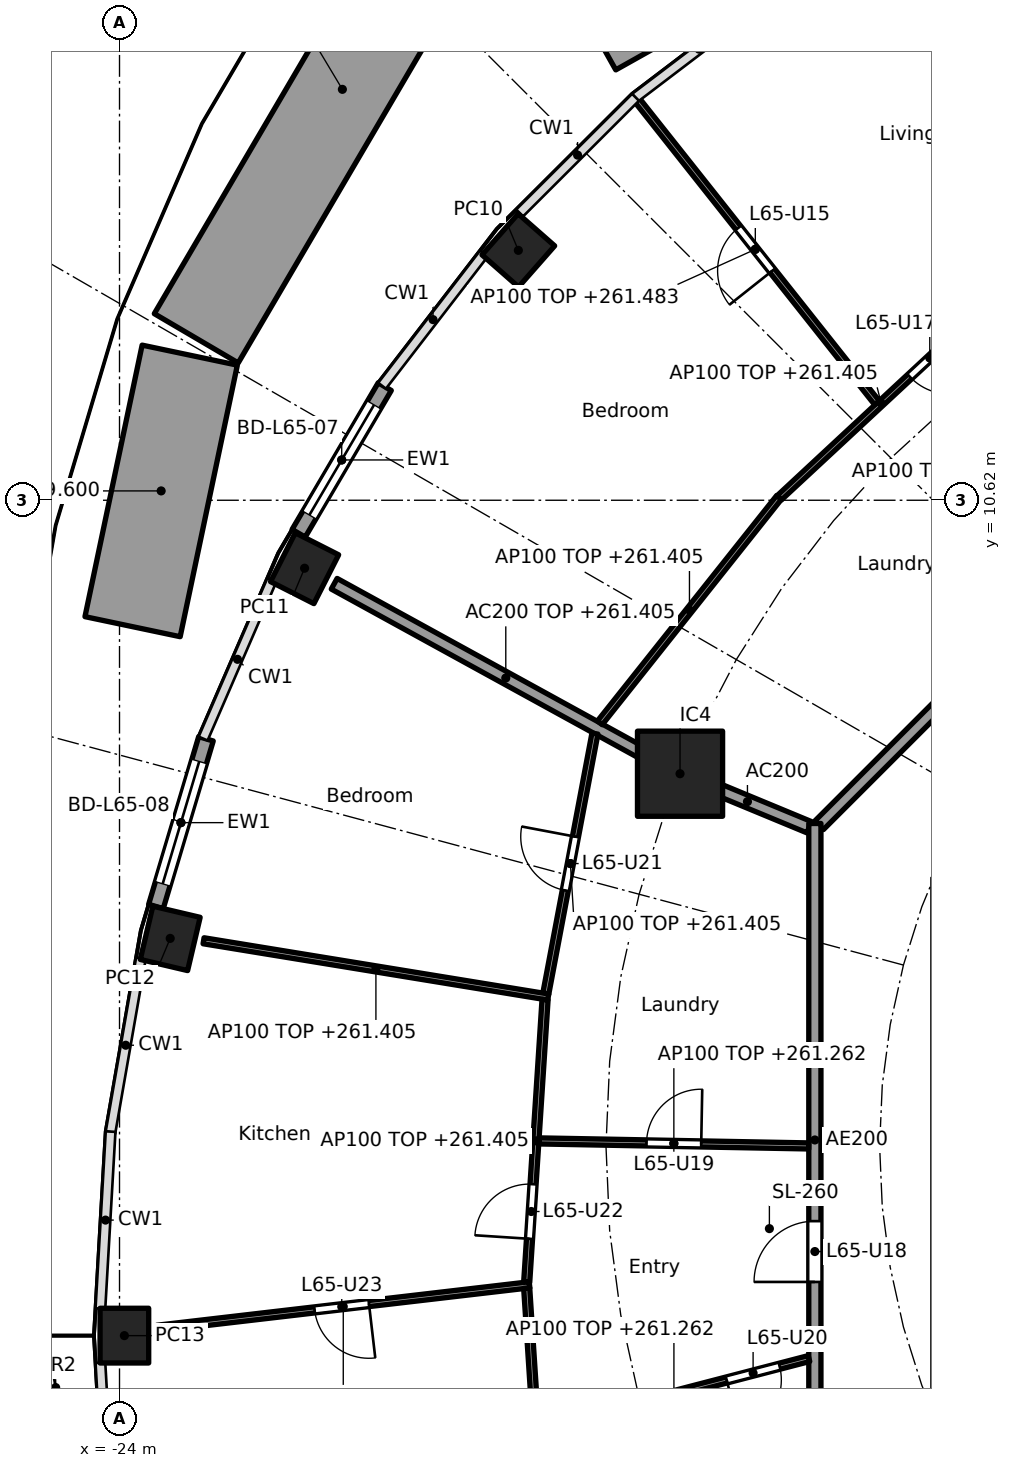
"""IFC4 building model, lengths in metres.
Left out: names, types, materials, properties, quantities, classifications, styles, units other than length and angle.
Written with IfcOpenShell. Run it as: python <this file> out.ifc"""

import sys

from ifc_helpers import new_model, si_unit, direction, frame, frame_2d, origin, origin_2d, place, context, subcontext, project, spatial, rectangle, hollow_rectangle, extrude, element, fill, save


model = new_model("IFC4")
c1 = context("Model", 3, precision=1e-05, world=origin(), true_north=direction((0.0, 1.0)))
c2 = subcontext(c1, "Body", "Model", "MODEL_VIEW")
j1 = project(units=[si_unit("LENGTHUNIT", "METRE"), si_unit("PLANEANGLEUNIT", "RADIAN")], contexts=[c1])
p1 = place(None, origin())
s1 = spatial("IfcSite", under=j1, at=p1, CompositionType="ELEMENT")
p2 = place(p1, origin())
s2 = spatial("IfcBuilding", under=s1, at=p2, CompositionType="ELEMENT")
p3 = place(p2, frame((0.0, 0.0, 258.5)))
s3 = spatial("IfcBuildingStorey", under=s2, at=p3, CompositionType="ELEMENT", Elevation=258.5)
for number, where, z_axis, x_axis in (
    (1, (-17.441, 14.73, -0.26), (0.0, 0.0, 1.0), (-0.66, -0.751, 0.0)),
    (2, (-20.957, 9.502, -0.26), (0.0, 0.0, 1.0), (-0.452, -0.892, 0.0)),
    (3, (-23.166, 3.415, -0.26), (0.0, 0.0, 1.0), (-0.229, -0.973, 0.0)),
    (4, (-23.92, -3.118, -0.26), (0.0, 0.0, 1.0), (0.0, -1.0, 0.0)),
):
    element("IfcColumn", number, at=place(p3, frame(where, z_axis=z_axis, x_axis=x_axis)), inside=s3, PredefinedType="COLUMN", context=c2, shape_type="SweptSolid", body=[
        extrude(hollow_rectangle(XDim=0.9, YDim=0.8, WallThickness=0.028, at=origin_2d()), origin(), (0.0, 0.0, 1.0), 3.96),
    ])
p4 = place(p3, frame((-14.782, 6.123, 0.0), z_axis=(0.0, 0.0, 1.0), x_axis=(1.0, 0.0, 0.0)))
e5 = element("IfcColumn", 5, at=p4, inside=s3, PredefinedType="COLUMN", context=c2, shape_type="SweptSolid", body=[
    extrude(rectangle(XDim=1.4, YDim=1.4, at=origin_2d()), origin(), (0.0, 0.0, 1.0), 3.7),
])
p5 = place(p3, frame((-21.054, 10.077, 0.0), z_axis=(0.0, 0.0, 1.0), x_axis=(0.506371364425, 0.862315511452, 0.0)))
e6 = element("IfcWall", 6, at=p5, inside=s3, PredefinedType="SOLIDWALL", context=c2, shape_type="SweptSolid", body=[
    extrude(rectangle(XDim=2.796, YDim=0.25, at=frame_2d((1.398, 0.0))), origin(), (0.0, 0.0, 1.0), 3.44),
])
p6 = place(p5, frame((0.348, 0.0, 0.0)))
e7 = element("IfcOpeningElement", 7, at=p6, cuts=e6, PredefinedType="OPENING", context=c2, shape_type="SweptSolid", body=[
    extrude(rectangle(XDim=2.1, YDim=2.4, at=frame_2d((1.05, 1.2))), frame((0.0, 0.135, 0.0), z_axis=(0.0, -1.0, 0.0), x_axis=(1.0, 0.0, 0.0)), (0.0, 0.0, 1.0), 0.27),
])
p7 = place(p3, frame((-23.401, 3.94, 0.0), z_axis=(0.0, 0.0, 1.0), x_axis=(0.285876209024, 0.9582665564, 0.0)))
e8 = element("IfcWall", 8, at=p7, inside=s3, PredefinedType="SOLIDWALL", context=c2, shape_type="SweptSolid", body=[
    extrude(rectangle(XDim=2.877, YDim=0.25, at=frame_2d((1.438, 0.0))), origin(), (0.0, 0.0, 1.0), 3.44),
])
p8 = place(p7, frame((0.389, 0.0, 0.0)))
e9 = element("IfcOpeningElement", 9, at=p8, cuts=e8, PredefinedType="OPENING", context=c2, shape_type="SweptSolid", body=[
    extrude(rectangle(XDim=2.1, YDim=2.4, at=frame_2d((1.05, 1.2))), frame((0.0, 0.135, 0.0), z_axis=(0.0, -1.0, 0.0), x_axis=(1.0, 0.0, 0.0)), (0.0, 0.0, 1.0), 0.27),
])
p9 = place(p3, frame((-23.785, 8.541, 0.0), z_axis=(0.0, 0.0, 1.0), x_axis=(0.205983516992, 0.978555461243, 0.0)))
e10 = element("IfcWall", 10, at=p9, inside=s3, PredefinedType="SOLIDWALL", context=c2, shape_type="SweptSolid", body=[
    extrude(rectangle(XDim=4.563, YDim=1.6, at=frame_2d((2.282, 0.0))), origin(), (0.0, 0.0, 1.0), 1.1),
])
p10 = place(p3, frame((-22.738, 13.283, 0.0), z_axis=(0.0, 0.0, 1.0), x_axis=(0.506201816041, 0.862415051722, 0.0)))
e11 = element("IfcWall", 11, at=p10, inside=s3, PredefinedType="SOLIDWALL", context=c2, shape_type="SweptSolid", body=[
    extrude(rectangle(XDim=9.495, YDim=1.6, at=frame_2d((4.747, 0.0))), origin(), (0.0, 0.0, 1.0), 1.1),
])
p11 = place(p3, frame((-8.179, 22.911, 0.0), z_axis=(0.0, 0.0, 1.0), x_axis=(-0.872191481834, -0.489164613413, 0.0)))
e12 = element("IfcWall", 12, at=p11, inside=s3, PredefinedType="SOLIDWALL", context=c2, shape_type="SweptSolid", body=[
    extrude(rectangle(XDim=9.231, YDim=1.6, at=frame_2d((4.615, 0.0))), origin(), (0.0, 0.0, 1.0), 1.1),
])
p12 = place(p3, frame((-12.657, 5.243, 0.0), z_axis=(0.0, 0.0, 1.0), x_axis=(-0.923869415315, 0.382707856524, 0.0)))
e13 = element("IfcWall", 13, at=p12, inside=s3, PredefinedType="PARTITIONING", context=c2, shape_type="SweptSolid", body=[
    extrude(rectangle(XDim=2.2, YDim=0.2, at=frame_2d((1.1, 0.0))), origin(), (0.0, 0.0, 1.0), 3.44),
])
p13 = place(p3, frame((-14.826, 6.147, 0.0), z_axis=(0.0, 0.0, 1.0), x_axis=(-0.876484755865, 0.481429613481, 0.0)))
e14 = element("IfcWall", 14, at=p13, inside=s3, PredefinedType="PARTITIONING", context=c2, shape_type="SweptSolid", body=[
    extrude(rectangle(XDim=6.439, YDim=0.2, at=frame_2d((3.219, 0.0))), origin(), (0.0, 0.0, 1.0), 2.905),
])
p14 = place(p3, frame((-5.275, 12.494, 0.0), z_axis=(0.0, 0.0, 1.0), x_axis=(-0.707106781187, -0.707106781187, 0.0)))
e15 = element("IfcWall", 15, at=p14, inside=s3, PredefinedType="PARTITIONING", context=c2, shape_type="SweptSolid", body=[
    extrude(rectangle(XDim=10.209, YDim=0.2, at=frame_2d((5.104, 0.0))), origin(), (0.0, 0.0, 1.0), 3.44),
])
p15 = place(p3, frame((-12.565, 5.304, 0.0), z_axis=(0.0, 0.0, 1.0), x_axis=(0.0, -1.0, 0.0)))
e16 = element("IfcWall", 16, at=p15, inside=s3, PredefinedType="PARTITIONING", context=c2, shape_type="SweptSolid", body=[
    extrude(rectangle(XDim=10.409, YDim=0.2, at=frame_2d((5.205, 0.0))), origin(), (0.0, 0.0, 1.0), 3.44),
])
p16 = place(p15, frame((6.539, 0.0, 0.0)))
e17 = element("IfcOpeningElement", 17, at=p16, cuts=e16, PredefinedType="OPENING", context=c2, shape_type="SweptSolid", body=[
    extrude(rectangle(XDim=1.0, YDim=2.1, at=frame_2d((0.5, 1.05))), frame((0.0, 0.11, 0.0), z_axis=(0.0, -1.0, 0.0), x_axis=(1.0, 0.0, 0.0)), (0.0, 0.0, 1.0), 0.22),
])
p17 = place(p3, frame((-9.802, 13.77, 0.0), z_axis=(0.0, 0.0, 1.0), x_axis=(-0.732662099478, -0.680592571212, 0.0)))
e18 = element("IfcWall", 18, at=p17, inside=s3, PredefinedType="PARTITIONING", context=c2, shape_type="SweptSolid", body=[
    extrude(rectangle(XDim=4.567, YDim=0.1, at=frame_2d((2.283, 0.0))), origin(), (0.0, 0.0, 1.0), 2.905),
])
p18 = place(p17, frame((0.742, 0.0, 0.0)))
e19 = element("IfcOpeningElement", 19, at=p18, cuts=e18, PredefinedType="OPENING", context=c2, shape_type="SweptSolid", body=[
    extrude(rectangle(XDim=0.9, YDim=2.1, at=frame_2d((0.45, 1.05))), frame((0.0, 0.06, 0.0), z_axis=(0.0, -1.0, 0.0), x_axis=(1.0, 0.0, 0.0)), (0.0, 0.0, 1.0), 0.12),
])
p19 = place(p3, frame((-11.543, 12.221, 0.0), z_axis=(0.0, 0.0, 1.0), x_axis=(-0.621117202271, 0.783717692185, 0.0)))
e20 = element("IfcWall", 20, at=p19, inside=s3, PredefinedType="PARTITIONING", context=c2, shape_type="SweptSolid", body=[
    extrude(rectangle(XDim=6.444, YDim=0.1, at=frame_2d((3.222, 0.0))), origin(), (0.0, 0.0, 1.0), 2.983),
])
p20 = place(p19, frame((2.772, 0.0, 0.0)))
e21 = element("IfcOpeningElement", 21, at=p20, cuts=e20, PredefinedType="OPENING", context=c2, shape_type="SweptSolid", body=[
    extrude(rectangle(XDim=0.9, YDim=2.1, at=frame_2d((0.45, 1.05))), frame((0.0, 0.06, 0.0), z_axis=(0.0, -1.0, 0.0), x_axis=(1.0, 0.0, 0.0)), (0.0, 0.0, 1.0), 0.12),
])
p21 = place(p3, frame((-13.154, 10.667, 0.0), z_axis=(0.0, 0.0, 1.0), x_axis=(-0.622246555556, -0.782821323227, 0.0)))
e22 = element("IfcWall", 22, at=p21, inside=s3, PredefinedType="PARTITIONING", context=c2, shape_type="SweptSolid", body=[
    extrude(rectangle(XDim=4.736, YDim=0.1, at=frame_2d((2.368, 0.0))), origin(), (0.0, 0.0, 1.0), 2.905),
])
p22 = place(p3, frame((-16.181, 6.783, 0.0), z_axis=(0.0, 0.0, 1.0), x_axis=(-0.185670583745, -0.982612046706, 0.0)))
e23 = element("IfcWall", 23, at=p22, inside=s3, PredefinedType="PARTITIONING", context=c2, shape_type="SweptSolid", body=[
    extrude(rectangle(XDim=4.351, YDim=0.1, at=frame_2d((2.176, 0.0))), origin(), (0.0, 0.0, 1.0), 2.905),
])
p23 = place(p22, frame((1.726, 0.0, 0.0)))
e24 = element("IfcOpeningElement", 24, at=p23, cuts=e23, PredefinedType="OPENING", context=c2, shape_type="SweptSolid", body=[
    extrude(rectangle(XDim=0.9, YDim=2.1, at=frame_2d((0.45, 1.05))), frame((0.0, 0.06, 0.0), z_axis=(0.0, -1.0, 0.0), x_axis=(1.0, 0.0, 0.0)), (0.0, 0.0, 1.0), 0.12),
])
p24 = place(p3, frame((-16.949, 2.451, 0.0), z_axis=(0.0, 0.0, 1.0), x_axis=(-0.986937570833, 0.161103169673, 0.0)))
e25 = element("IfcWall", 25, at=p24, inside=s3, PredefinedType="PARTITIONING", context=c2, shape_type="SweptSolid", body=[
    extrude(rectangle(XDim=5.743, YDim=0.1, at=frame_2d((2.872, 0.0))), origin(), (0.0, 0.0, 1.0), 2.905),
])
p25 = place(p3, frame((-17.002, 2.409, 0.0), z_axis=(0.0, 0.0, 1.0), x_axis=(-0.064855550758, -0.997894662545, 0.0)))
e26 = element("IfcWall", 26, at=p25, inside=s3, PredefinedType="PARTITIONING", context=c2, shape_type="SweptSolid", body=[
    extrude(rectangle(XDim=4.656, YDim=0.1, at=frame_2d((2.328, 0.0))), origin(), (0.0, 0.0, 1.0), 2.905),
])
p26 = place(p25, frame((3.042, 0.0, 0.0)))
e27 = element("IfcOpeningElement", 27, at=p26, cuts=e26, PredefinedType="OPENING", context=c2, shape_type="SweptSolid", body=[
    extrude(rectangle(XDim=0.9, YDim=2.1, at=frame_2d((0.45, 1.05))), frame((0.0, 0.06, 0.0), z_axis=(0.0, -1.0, 0.0), x_axis=(1.0, 0.0, 0.0)), (0.0, 0.0, 1.0), 0.12),
])
p27 = place(p3, frame((-12.665, 0.002, 0.0), z_axis=(0.0, 0.0, 1.0), x_axis=(-0.999827178165, 0.018590691287, 0.0)))
e28 = element("IfcWall", 28, at=p27, inside=s3, PredefinedType="PARTITIONING", context=c2, shape_type="SweptSolid", body=[
    extrude(rectangle(XDim=4.439, YDim=0.1, at=frame_2d((2.219, 0.0))), origin(), (0.0, 0.0, 1.0), 2.762),
])
p28 = place(p27, frame((1.769, 0.0, 0.0)))
e29 = element("IfcOpeningElement", 29, at=p28, cuts=e28, PredefinedType="OPENING", context=c2, shape_type="SweptSolid", body=[
    extrude(rectangle(XDim=0.9, YDim=2.1, at=frame_2d((0.45, 1.05))), frame((0.0, 0.06, 0.0), z_axis=(0.0, -1.0, 0.0), x_axis=(1.0, 0.0, 0.0)), (0.0, 0.0, 1.0), 0.12),
])
p29 = place(p3, frame((-17.257, -2.282, 0.0), z_axis=(0.0, 0.0, 1.0), x_axis=(-0.993266024162, -0.11585596767, 0.0)))
e30 = element("IfcWall", 30, at=p29, inside=s3, PredefinedType="PARTITIONING", context=c2, shape_type="SweptSolid", body=[
    extrude(rectangle(XDim=6.168, YDim=0.1, at=frame_2d((3.084, 0.0))), origin(), (0.0, 0.0, 1.0), 2.905),
])
p30 = place(p29, frame((2.659, 0.0, 0.0)))
e31 = element("IfcOpeningElement", 31, at=p30, cuts=e30, PredefinedType="OPENING", context=c2, shape_type="SweptSolid", body=[
    extrude(rectangle(XDim=0.9, YDim=2.1, at=frame_2d((0.45, 1.05))), frame((0.0, 0.06, 0.0), z_axis=(0.0, -1.0, 0.0), x_axis=(1.0, 0.0, 0.0)), (0.0, 0.0, 1.0), 0.12),
])
p31 = place(p3, frame((-17.304, -2.338, 0.0), z_axis=(0.0, 0.0, 1.0), x_axis=(0.065003615989, -0.997885028402, 0.0)))
e32 = element("IfcWall", 32, at=p31, inside=s3, PredefinedType="PARTITIONING", context=c2, shape_type="SweptSolid", body=[
    extrude(rectangle(XDim=4.759, YDim=0.1, at=frame_2d((2.379, 0.0))), origin(), (0.0, 0.0, 1.0), 2.905),
])
p32 = place(p3, frame((-12.662, -3.495, 0.0), z_axis=(0.0, 0.0, 1.0), x_axis=(-0.967834941053, -0.251586022817, 0.0)))
e33 = element("IfcWall", 33, at=p32, inside=s3, PredefinedType="PARTITIONING", context=c2, shape_type="SweptSolid", body=[
    extrude(rectangle(XDim=4.59, YDim=0.1, at=frame_2d((2.295, 0.0))), origin(), (0.0, 0.0, 1.0), 2.762),
])
p33 = place(p32, frame((0.5, 0.0, 0.0)))
e34 = element("IfcOpeningElement", 34, at=p33, cuts=e33, PredefinedType="OPENING", context=c2, shape_type="SweptSolid", body=[
    extrude(rectangle(XDim=0.9, YDim=2.1, at=frame_2d((0.45, 1.05))), frame((0.0, 0.06, 0.0), z_axis=(0.0, -1.0, 0.0), x_axis=(1.0, 0.0, 0.0)), (0.0, 0.0, 1.0), 0.12),
])
p34 = place(p6, origin())
e35 = element("IfcDoor", 35, at=p34, inside=s3, OperationType="SLIDING_TO_LEFT", PredefinedType="DOOR", context=c2, shape_type="SweptSolid", body=[
    extrude(rectangle(XDim=2.1, YDim=2.4, at=frame_2d((1.05, 1.2))), frame((0.0, 0.025, 0.0), z_axis=(0.0, -1.0, 0.0), x_axis=(1.0, 0.0, 0.0)), (0.0, 0.0, 1.0), 0.05),
])
fill(e7, e35)
p35 = place(p8, origin())
e36 = element("IfcDoor", 36, at=p35, inside=s3, OperationType="SLIDING_TO_LEFT", PredefinedType="DOOR", context=c2, shape_type="SweptSolid", body=[
    extrude(rectangle(XDim=2.1, YDim=2.4, at=frame_2d((1.05, 1.2))), frame((0.0, 0.025, 0.0), z_axis=(0.0, -1.0, 0.0), x_axis=(1.0, 0.0, 0.0)), (0.0, 0.0, 1.0), 0.05),
])
fill(e9, e36)
p36 = place(p20, origin())
e37 = element("IfcDoor", 37, at=p36, inside=s3, OperationType="SINGLE_SWING_LEFT", PredefinedType="DOOR", context=c2, shape_type="SweptSolid", body=[
    extrude(rectangle(XDim=0.9, YDim=2.1, at=frame_2d((0.45, 1.05))), frame((0.0, 0.025, 0.0), z_axis=(0.0, -1.0, 0.0), x_axis=(1.0, 0.0, 0.0)), (0.0, 0.0, 1.0), 0.05),
])
fill(e21, e37)
p37 = place(p18, origin())
e38 = element("IfcDoor", 38, at=p37, inside=s3, OperationType="SINGLE_SWING_LEFT", PredefinedType="DOOR", context=c2, shape_type="SweptSolid", body=[
    extrude(rectangle(XDim=0.9, YDim=2.1, at=frame_2d((0.45, 1.05))), frame((0.0, 0.025, 0.0), z_axis=(0.0, -1.0, 0.0), x_axis=(1.0, 0.0, 0.0)), (0.0, 0.0, 1.0), 0.05),
])
fill(e19, e38)
p38 = place(p16, frame((1.0, 0.0, 0.0), x_axis=(-1.0, 0.0, 0.0)))
e39 = element("IfcDoor", 39, at=p38, inside=s3, OperationType="SINGLE_SWING_LEFT", PredefinedType="DOOR", context=c2, shape_type="SweptSolid", body=[
    extrude(rectangle(XDim=1.0, YDim=2.1, at=frame_2d((0.5, 1.05))), frame((0.0, 0.025, 0.0), z_axis=(0.0, -1.0, 0.0), x_axis=(1.0, 0.0, 0.0)), (0.0, 0.0, 1.0), 0.05),
])
fill(e17, e39)
p39 = place(p28, frame((0.9, 0.0, 0.0), x_axis=(-1.0, 0.0, 0.0)))
e40 = element("IfcDoor", 40, at=p39, inside=s3, OperationType="SINGLE_SWING_RIGHT", PredefinedType="DOOR", context=c2, shape_type="SweptSolid", body=[
    extrude(rectangle(XDim=0.9, YDim=2.1, at=frame_2d((0.45, 1.05))), frame((0.0, 0.025, 0.0), z_axis=(0.0, -1.0, 0.0), x_axis=(1.0, 0.0, 0.0)), (0.0, 0.0, 1.0), 0.05),
])
fill(e29, e40)
p40 = place(p33, origin())
e41 = element("IfcDoor", 41, at=p40, inside=s3, OperationType="SINGLE_SWING_RIGHT", PredefinedType="DOOR", context=c2, shape_type="SweptSolid", body=[
    extrude(rectangle(XDim=0.9, YDim=2.1, at=frame_2d((0.45, 1.05))), frame((0.0, 0.025, 0.0), z_axis=(0.0, -1.0, 0.0), x_axis=(1.0, 0.0, 0.0)), (0.0, 0.0, 1.0), 0.05),
])
fill(e34, e41)
p41 = place(p23, frame((0.9, 0.0, 0.0), x_axis=(-1.0, 0.0, 0.0)))
e42 = element("IfcDoor", 42, at=p41, inside=s3, OperationType="SINGLE_SWING_RIGHT", PredefinedType="DOOR", context=c2, shape_type="SweptSolid", body=[
    extrude(rectangle(XDim=0.9, YDim=2.1, at=frame_2d((0.45, 1.05))), frame((0.0, 0.025, 0.0), z_axis=(0.0, -1.0, 0.0), x_axis=(1.0, 0.0, 0.0)), (0.0, 0.0, 1.0), 0.05),
])
fill(e24, e42)
p42 = place(p26, frame((0.9, 0.0, 0.0), x_axis=(-1.0, 0.0, 0.0)))
e43 = element("IfcDoor", 43, at=p42, inside=s3, OperationType="SINGLE_SWING_LEFT", PredefinedType="DOOR", context=c2, shape_type="SweptSolid", body=[
    extrude(rectangle(XDim=0.9, YDim=2.1, at=frame_2d((0.45, 1.05))), frame((0.0, 0.025, 0.0), z_axis=(0.0, -1.0, 0.0), x_axis=(1.0, 0.0, 0.0)), (0.0, 0.0, 1.0), 0.05),
])
fill(e27, e43)
p43 = place(p30, origin())
e44 = element("IfcDoor", 44, at=p43, inside=s3, OperationType="SINGLE_SWING_LEFT", PredefinedType="DOOR", context=c2, shape_type="SweptSolid", body=[
    extrude(rectangle(XDim=0.9, YDim=2.1, at=frame_2d((0.45, 1.05))), frame((0.0, 0.025, 0.0), z_axis=(0.0, -1.0, 0.0), x_axis=(1.0, 0.0, 0.0)), (0.0, 0.0, 1.0), 0.05),
])
fill(e31, e44)
save(model, sys.argv[1])
